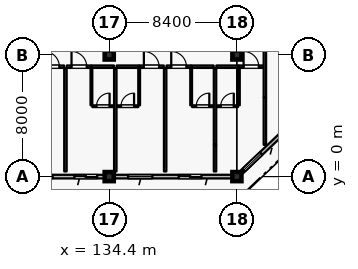
"""IFC4 building model, lengths in metres.
Left out: names, types, materials, properties, quantities, classifications, styles, units other than length and angle.
Written with IfcOpenShell. Run it as: python <this file> out.ifc"""

import sys

from ifc_helpers import new_model, si_unit, direction, frame, frame_2d, origin, origin_2d, place, context, subcontext, project, spatial, rectangle, extrude, element, fill, save


model = new_model("IFC4")
c1 = context("Model", 3, precision=1e-05, world=origin(), true_north=direction((0.0, 1.0)))
c2 = subcontext(c1, "Body", "Model", "MODEL_VIEW")
j1 = project(units=[si_unit("LENGTHUNIT", "METRE"), si_unit("PLANEANGLEUNIT", "RADIAN")], contexts=[c1])
p1 = place(None, origin())
s1 = spatial("IfcSite", under=j1, at=p1, CompositionType="ELEMENT")
p2 = place(p1, origin())
s2 = spatial("IfcBuilding", under=s1, at=p2, CompositionType="ELEMENT")
p3 = place(p2, frame((0.0, 0.0, 39.6)))
s3 = spatial("IfcBuildingStorey", under=s2, at=p3, CompositionType="ELEMENT", Elevation=39.6)
for number, where, z_axis, x_axis in (
    (1, (134.4, 0.0, 0.0), (0.0, 0.0, 1.0), (1.0, 0.0, 0.0)),
    (2, (142.8, 0.0, 0.0), (0.0, 0.0, 1.0), (1.0, 0.0, 0.0)),
    (3, (134.4, 8.0, 0.0), (0.0, 0.0, 1.0), (1.0, 0.0, 0.0)),
    (4, (142.8, 8.0, 0.0), (0.0, 0.0, 1.0), (1.0, 0.0, 0.0)),
):
    element("IfcColumn", number, at=place(p3, frame(where, z_axis=z_axis, x_axis=x_axis)), inside=s3, PredefinedType="COLUMN", context=c2, shape_type="SweptSolid", body=[
        extrude(rectangle(XDim=0.6, YDim=0.6, at=origin_2d()), origin(), (0.0, 0.0, 1.0), 3.6),
    ])
p4 = place(p3, frame((134.1, 0.0, 0.0), z_axis=(0.0, 0.0, 1.0), x_axis=(-1.0, 0.0, 0.0)))
e5 = element("IfcWall", 5, at=p4, inside=s3, PredefinedType="SOLIDWALL", context=c2, shape_type="SweptSolid", body=[
    extrude(rectangle(XDim=7.8, YDim=0.24, at=frame_2d((3.9, 0.0))), origin(), (0.0, 0.0, 1.0), 2.89),
])
p5 = place(p4, frame((0.49, 0.0, 0.0)))
e6 = element("IfcOpeningElement", 6, at=p5, cuts=e5, PredefinedType="OPENING", context=c2, shape_type="SweptSolid", body=[
    extrude(rectangle(XDim=1.5, YDim=2.25, at=frame_2d((0.75, 1.125))), frame((0.0, 0.13, 0.0), z_axis=(0.0, -1.0, 0.0), x_axis=(1.0, 0.0, 0.0)), (0.0, 0.0, 1.0), 0.26),
])
p6 = place(p4, frame((3.42, 0.0, 0.8)))
e7 = element("IfcOpeningElement", 7, at=p6, cuts=e5, PredefinedType="OPENING", context=c2, shape_type="SweptSolid", body=[
    extrude(rectangle(XDim=1.6, YDim=1.6, at=frame_2d((0.8, 0.8))), frame((0.0, 0.13, 0.0), z_axis=(0.0, -1.0, 0.0), x_axis=(1.0, 0.0, 0.0)), (0.0, 0.0, 1.0), 0.26),
])
p7 = place(p4, frame((6.08, 0.0, 0.8)))
e8 = element("IfcOpeningElement", 8, at=p7, cuts=e5, PredefinedType="OPENING", context=c2, shape_type="SweptSolid", body=[
    extrude(rectangle(XDim=1.6, YDim=1.6, at=frame_2d((0.8, 0.8))), frame((0.0, 0.13, 0.0), z_axis=(0.0, -1.0, 0.0), x_axis=(1.0, 0.0, 0.0)), (0.0, 0.0, 1.0), 0.26),
])
p8 = place(p3, frame((142.5, 0.0, 0.0), z_axis=(0.0, 0.0, 1.0), x_axis=(-1.0, 0.0, 0.0)))
e9 = element("IfcWall", 9, at=p8, inside=s3, PredefinedType="SOLIDWALL", context=c2, shape_type="SweptSolid", body=[
    extrude(rectangle(XDim=7.8, YDim=0.24, at=frame_2d((3.9, 0.0))), origin(), (0.0, 0.0, 1.0), 2.94),
])
p9 = place(p8, frame((2.03, 0.0, 0.0)))
e10 = element("IfcOpeningElement", 10, at=p9, cuts=e9, PredefinedType="OPENING", context=c2, shape_type="SweptSolid", body=[
    extrude(rectangle(XDim=1.5, YDim=2.25, at=frame_2d((0.75, 1.125))), frame((0.0, 0.13, 0.0), z_axis=(0.0, -1.0, 0.0), x_axis=(1.0, 0.0, 0.0)), (0.0, 0.0, 1.0), 0.26),
])
p10 = place(p8, frame((5.26, 0.0, 0.8)))
e11 = element("IfcOpeningElement", 11, at=p10, cuts=e9, PredefinedType="OPENING", context=c2, shape_type="SweptSolid", body=[
    extrude(rectangle(XDim=1.6, YDim=1.6, at=frame_2d((0.8, 0.8))), frame((0.0, 0.13, 0.0), z_axis=(0.0, -1.0, 0.0), x_axis=(1.0, 0.0, 0.0)), (0.0, 0.0, 1.0), 0.26),
])
p11 = place(p3, frame((150.9, 7.714, 0.0), z_axis=(0.0, 0.0, 1.0), x_axis=(-0.724145477467, -0.689647248573, 0.0)))
e12 = element("IfcWall", 12, at=p11, inside=s3, PredefinedType="SOLIDWALL", context=c2, shape_type="SweptSolid", body=[
    extrude(rectangle(XDim=10.771, YDim=0.24, at=frame_2d((5.385, 0.0))), origin(), (0.0, 0.0, 1.0), 2.94),
])
p12 = place(p11, frame((1.238, 0.0, 0.0)))
e13 = element("IfcOpeningElement", 13, at=p12, cuts=e12, PredefinedType="OPENING", context=c2, shape_type="SweptSolid", body=[
    extrude(rectangle(XDim=1.5, YDim=2.25, at=frame_2d((0.75, 1.125))), frame((0.0, 0.13, 0.0), z_axis=(0.0, -1.0, 0.0), x_axis=(1.0, 0.0, 0.0)), (0.0, 0.0, 1.0), 0.26),
])
p13 = place(p11, frame((5.58, 0.0, 0.8)))
e14 = element("IfcOpeningElement", 14, at=p13, cuts=e12, PredefinedType="OPENING", context=c2, shape_type="SweptSolid", body=[
    extrude(rectangle(XDim=1.6, YDim=1.6, at=frame_2d((0.8, 0.8))), frame((0.0, 0.13, 0.0), z_axis=(0.0, -1.0, 0.0), x_axis=(1.0, 0.0, 0.0)), (0.0, 0.0, 1.0), 0.26),
])
p14 = place(p11, frame((8.977, 0.0, 0.8)))
e15 = element("IfcOpeningElement", 15, at=p14, cuts=e12, PredefinedType="OPENING", context=c2, shape_type="SweptSolid", body=[
    extrude(rectangle(XDim=1.6, YDim=1.6, at=frame_2d((0.8, 0.8))), frame((0.0, 0.13, 0.0), z_axis=(0.0, -1.0, 0.0), x_axis=(1.0, 0.0, 0.0)), (0.0, 0.0, 1.0), 0.26),
])
p15 = place(p3, frame((129.81, 7.23, 0.0), z_axis=(0.0, 0.0, 1.0), x_axis=(1.0, 0.0, 0.0)))
e16 = element("IfcWall", 16, at=p15, inside=s3, PredefinedType="PARTITIONING", context=c2, shape_type="SweptSolid", body=[
    extrude(rectangle(XDim=1.62, YDim=0.16, at=frame_2d((0.81, 0.0))), origin(), (0.0, 0.0, 1.0), 3.335),
])
p16 = place(p15, frame((0.31, 0.0, 0.0)))
e17 = element("IfcOpeningElement", 17, at=p16, cuts=e16, PredefinedType="OPENING", context=c2, shape_type="SweptSolid", body=[
    extrude(rectangle(XDim=1.0, YDim=2.25, at=frame_2d((0.5, 1.125))), frame((0.0, 0.09, 0.0), z_axis=(0.0, -1.0, 0.0), x_axis=(1.0, 0.0, 0.0)), (0.0, 0.0, 1.0), 0.18),
])
p17 = place(p3, frame((131.61, 7.23, 0.0), z_axis=(0.0, 0.0, 1.0), x_axis=(1.0, 0.0, 0.0)))
e18 = element("IfcWall", 18, at=p17, inside=s3, PredefinedType="PARTITIONING", context=c2, shape_type="SweptSolid", body=[
    extrude(rectangle(XDim=1.62, YDim=0.16, at=frame_2d((0.81, 0.0))), origin(), (0.0, 0.0, 1.0), 3.335),
])
p18 = place(p17, frame((0.31, 0.0, 0.0)))
e19 = element("IfcOpeningElement", 19, at=p18, cuts=e18, PredefinedType="OPENING", context=c2, shape_type="SweptSolid", body=[
    extrude(rectangle(XDim=1.0, YDim=2.25, at=frame_2d((0.5, 1.125))), frame((0.0, 0.09, 0.0), z_axis=(0.0, -1.0, 0.0), x_axis=(1.0, 0.0, 0.0)), (0.0, 0.0, 1.0), 0.18),
])
p19 = place(p3, frame((133.24, 7.23, 0.0), z_axis=(0.0, 0.0, 1.0), x_axis=(1.0, 0.0, 0.0)))
e20 = element("IfcWall", 20, at=p19, inside=s3, PredefinedType="PARTITIONING", context=c2, shape_type="SweptSolid", body=[
    extrude(rectangle(XDim=1.47, YDim=0.16, at=frame_2d((0.735, 0.0))), origin(), (0.0, 0.0, 1.0), 3.335),
])
p20 = place(p3, frame((133.23, 4.69, 0.0), z_axis=(0.0, 0.0, 1.0), x_axis=(0.0, 1.0, 0.0)))
e21 = element("IfcWall", 21, at=p20, inside=s3, PredefinedType="PARTITIONING", context=c2, shape_type="SweptSolid", body=[
    extrude(rectangle(XDim=2.45, YDim=0.115, at=frame_2d((1.225, 0.0))), origin(), (0.0, 0.0, 1.0), 3.335),
])
p21 = place(p3, frame((133.29, 4.63, 0.0), z_axis=(0.0, 0.0, 1.0), x_axis=(1.0, 0.0, 0.0)))
e22 = element("IfcWall", 22, at=p21, inside=s3, PredefinedType="PARTITIONING", context=c2, shape_type="SweptSolid", body=[
    extrude(rectangle(XDim=1.41, YDim=0.115, at=frame_2d((0.705, 0.0))), origin(), (0.0, 0.0, 1.0), 3.335),
])
p22 = place(p21, frame((0.275, 0.0, 0.0)))
e23 = element("IfcOpeningElement", 23, at=p22, cuts=e22, PredefinedType="OPENING", context=c2, shape_type="SweptSolid", body=[
    extrude(rectangle(XDim=0.86, YDim=2.12, at=frame_2d((0.43, 1.06))), frame((0.0, 0.067, 0.0), z_axis=(0.0, -1.0, 0.0), x_axis=(1.0, 0.0, 0.0)), (0.0, 0.0, 1.0), 0.135),
])
p23 = place(p3, frame((131.52, 0.34, 0.0), z_axis=(0.0, 0.0, 1.0), x_axis=(0.0, 1.0, 0.0)))
e24 = element("IfcWall", 24, at=p23, inside=s3, PredefinedType="PARTITIONING", context=c2, shape_type="SweptSolid", body=[
    extrude(rectangle(XDim=6.8, YDim=0.16, at=frame_2d((3.4, 0.0))), origin(), (0.0, 0.0, 1.0), 3.335),
])
p24 = place(p3, frame((134.89, 7.23, 0.0), z_axis=(0.0, 0.0, 1.0), x_axis=(1.0, 0.0, 0.0)))
e25 = element("IfcWall", 25, at=p24, inside=s3, PredefinedType="PARTITIONING", context=c2, shape_type="SweptSolid", body=[
    extrude(rectangle(XDim=1.47, YDim=0.16, at=frame_2d((0.735, 0.0))), origin(), (0.0, 0.0, 1.0), 3.335),
])
p25 = place(p3, frame((136.37, 7.23, 0.0), z_axis=(0.0, 0.0, 1.0), x_axis=(1.0, 0.0, 0.0)))
e26 = element("IfcWall", 26, at=p25, inside=s3, PredefinedType="PARTITIONING", context=c2, shape_type="SweptSolid", body=[
    extrude(rectangle(XDim=1.62, YDim=0.16, at=frame_2d((0.81, 0.0))), origin(), (0.0, 0.0, 1.0), 3.335),
])
p26 = place(p25, frame((0.31, 0.0, 0.0)))
e27 = element("IfcOpeningElement", 27, at=p26, cuts=e26, PredefinedType="OPENING", context=c2, shape_type="SweptSolid", body=[
    extrude(rectangle(XDim=1.0, YDim=2.25, at=frame_2d((0.5, 1.125))), frame((0.0, 0.09, 0.0), z_axis=(0.0, -1.0, 0.0), x_axis=(1.0, 0.0, 0.0)), (0.0, 0.0, 1.0), 0.18),
])
p27 = place(p3, frame((136.37, 4.69, 0.0), z_axis=(0.0, 0.0, 1.0), x_axis=(0.0, 1.0, 0.0)))
e28 = element("IfcWall", 28, at=p27, inside=s3, PredefinedType="PARTITIONING", context=c2, shape_type="SweptSolid", body=[
    extrude(rectangle(XDim=2.45, YDim=0.115, at=frame_2d((1.225, 0.0))), origin(), (0.0, 0.0, 1.0), 3.335),
])
p28 = place(p3, frame((134.9, 4.63, 0.0), z_axis=(0.0, 0.0, 1.0), x_axis=(1.0, 0.0, 0.0)))
e29 = element("IfcWall", 29, at=p28, inside=s3, PredefinedType="PARTITIONING", context=c2, shape_type="SweptSolid", body=[
    extrude(rectangle(XDim=1.41, YDim=0.115, at=frame_2d((0.705, 0.0))), origin(), (0.0, 0.0, 1.0), 3.335),
])
p29 = place(p28, frame((0.275, 0.0, 0.0)))
e30 = element("IfcOpeningElement", 30, at=p29, cuts=e29, PredefinedType="OPENING", context=c2, shape_type="SweptSolid", body=[
    extrude(rectangle(XDim=0.86, YDim=2.12, at=frame_2d((0.43, 1.06))), frame((0.0, 0.067, 0.0), z_axis=(0.0, -1.0, 0.0), x_axis=(1.0, 0.0, 0.0)), (0.0, 0.0, 1.0), 0.135),
])
p30 = place(p3, frame((134.8, 0.34, 0.0), z_axis=(0.0, 0.0, 1.0), x_axis=(0.0, 1.0, 0.0)))
e31 = element("IfcWall", 31, at=p30, inside=s3, PredefinedType="PARTITIONING", context=c2, shape_type="SweptSolid", body=[
    extrude(rectangle(XDim=6.8, YDim=0.16, at=frame_2d((3.4, 0.0))), origin(), (0.0, 0.0, 1.0), 3.335),
])
p31 = place(p3, frame((138.17, 7.23, 0.0), z_axis=(0.0, 0.0, 1.0), x_axis=(1.0, 0.0, 0.0)))
e32 = element("IfcWall", 32, at=p31, inside=s3, PredefinedType="PARTITIONING", context=c2, shape_type="SweptSolid", body=[
    extrude(rectangle(XDim=1.62, YDim=0.16, at=frame_2d((0.81, 0.0))), origin(), (0.0, 0.0, 1.0), 3.335),
])
p32 = place(p31, frame((0.31, 0.0, 0.0)))
e33 = element("IfcOpeningElement", 33, at=p32, cuts=e32, PredefinedType="OPENING", context=c2, shape_type="SweptSolid", body=[
    extrude(rectangle(XDim=1.0, YDim=2.25, at=frame_2d((0.5, 1.125))), frame((0.0, 0.09, 0.0), z_axis=(0.0, -1.0, 0.0), x_axis=(1.0, 0.0, 0.0)), (0.0, 0.0, 1.0), 0.18),
])
p33 = place(p3, frame((139.8, 7.23, 0.0), z_axis=(0.0, 0.0, 1.0), x_axis=(1.0, 0.0, 0.0)))
e34 = element("IfcWall", 34, at=p33, inside=s3, PredefinedType="PARTITIONING", context=c2, shape_type="SweptSolid", body=[
    extrude(rectangle(XDim=1.47, YDim=0.16, at=frame_2d((0.735, 0.0))), origin(), (0.0, 0.0, 1.0), 3.335),
])
p34 = place(p3, frame((139.79, 4.69, 0.0), z_axis=(0.0, 0.0, 1.0), x_axis=(0.0, 1.0, 0.0)))
e35 = element("IfcWall", 35, at=p34, inside=s3, PredefinedType="PARTITIONING", context=c2, shape_type="SweptSolid", body=[
    extrude(rectangle(XDim=2.45, YDim=0.115, at=frame_2d((1.225, 0.0))), origin(), (0.0, 0.0, 1.0), 3.335),
])
p35 = place(p3, frame((139.85, 4.63, 0.0), z_axis=(0.0, 0.0, 1.0), x_axis=(1.0, 0.0, 0.0)))
e36 = element("IfcWall", 36, at=p35, inside=s3, PredefinedType="PARTITIONING", context=c2, shape_type="SweptSolid", body=[
    extrude(rectangle(XDim=1.41, YDim=0.115, at=frame_2d((0.705, 0.0))), origin(), (0.0, 0.0, 1.0), 3.335),
])
p36 = place(p35, frame((0.275, 0.0, 0.0)))
e37 = element("IfcOpeningElement", 37, at=p36, cuts=e36, PredefinedType="OPENING", context=c2, shape_type="SweptSolid", body=[
    extrude(rectangle(XDim=0.86, YDim=2.12, at=frame_2d((0.43, 1.06))), frame((0.0, 0.067, 0.0), z_axis=(0.0, -1.0, 0.0), x_axis=(1.0, 0.0, 0.0)), (0.0, 0.0, 1.0), 0.135),
])
p37 = place(p3, frame((138.08, 0.34, 0.0), z_axis=(0.0, 0.0, 1.0), x_axis=(0.0, 1.0, 0.0)))
e38 = element("IfcWall", 38, at=p37, inside=s3, PredefinedType="PARTITIONING", context=c2, shape_type="SweptSolid", body=[
    extrude(rectangle(XDim=6.8, YDim=0.16, at=frame_2d((3.4, 0.0))), origin(), (0.0, 0.0, 1.0), 3.335),
])
p38 = place(p3, frame((141.36, 0.34, 0.0), z_axis=(0.0, 0.0, 1.0), x_axis=(0.0, 1.0, 0.0)))
e39 = element("IfcWall", 39, at=p38, inside=s3, PredefinedType="PARTITIONING", context=c2, shape_type="SweptSolid", body=[
    extrude(rectangle(XDim=1.74, YDim=0.16, at=frame_2d((0.87, 0.0))), origin(), (0.0, 0.0, 1.0), 3.335),
])
p39 = place(p3, frame((141.45, 7.23, 0.0), z_axis=(0.0, 0.0, 1.0), x_axis=(1.0, 0.0, 0.0)))
e40 = element("IfcWall", 40, at=p39, inside=s3, PredefinedType="PARTITIONING", context=c2, shape_type="SweptSolid", body=[
    extrude(rectangle(XDim=1.47, YDim=0.16, at=frame_2d((0.735, 0.0))), origin(), (0.0, 0.0, 1.0), 3.335),
])
p40 = place(p3, frame((142.93, 7.23, 0.0), z_axis=(0.0, 0.0, 1.0), x_axis=(1.0, 0.0, 0.0)))
e41 = element("IfcWall", 41, at=p40, inside=s3, PredefinedType="PARTITIONING", context=c2, shape_type="SweptSolid", body=[
    extrude(rectangle(XDim=1.62, YDim=0.16, at=frame_2d((0.81, 0.0))), origin(), (0.0, 0.0, 1.0), 3.335),
])
p41 = place(p40, frame((0.31, 0.0, 0.0)))
e42 = element("IfcOpeningElement", 42, at=p41, cuts=e41, PredefinedType="OPENING", context=c2, shape_type="SweptSolid", body=[
    extrude(rectangle(XDim=1.0, YDim=2.25, at=frame_2d((0.5, 1.125))), frame((0.0, 0.09, 0.0), z_axis=(0.0, -1.0, 0.0), x_axis=(1.0, 0.0, 0.0)), (0.0, 0.0, 1.0), 0.18),
])
p42 = place(p3, frame((142.93, 4.69, 0.0), z_axis=(0.0, 0.0, 1.0), x_axis=(0.0, 1.0, 0.0)))
e43 = element("IfcWall", 43, at=p42, inside=s3, PredefinedType="PARTITIONING", context=c2, shape_type="SweptSolid", body=[
    extrude(rectangle(XDim=2.45, YDim=0.115, at=frame_2d((1.225, 0.0))), origin(), (0.0, 0.0, 1.0), 2.74),
])
p43 = place(p3, frame((141.46, 4.63, 0.0), z_axis=(0.0, 0.0, 1.0), x_axis=(1.0, 0.0, 0.0)))
e44 = element("IfcWall", 44, at=p43, inside=s3, PredefinedType="PARTITIONING", context=c2, shape_type="SweptSolid", body=[
    extrude(rectangle(XDim=1.41, YDim=0.115, at=frame_2d((0.705, 0.0))), origin(), (0.0, 0.0, 1.0), 3.335),
])
p44 = place(p43, frame((0.275, 0.0, 0.0)))
e45 = element("IfcOpeningElement", 45, at=p44, cuts=e44, PredefinedType="OPENING", context=c2, shape_type="SweptSolid", body=[
    extrude(rectangle(XDim=0.86, YDim=2.12, at=frame_2d((0.43, 1.06))), frame((0.0, 0.067, 0.0), z_axis=(0.0, -1.0, 0.0), x_axis=(1.0, 0.0, 0.0)), (0.0, 0.0, 1.0), 0.135),
])
p45 = place(p3, frame((141.36, 2.09, 0.0), z_axis=(0.0, 0.0, 1.0), x_axis=(0.0, 1.0, 0.0)))
e46 = element("IfcWall", 46, at=p45, inside=s3, PredefinedType="PARTITIONING", context=c2, shape_type="SweptSolid", body=[
    extrude(rectangle(XDim=5.05, YDim=0.16, at=frame_2d((2.525, 0.0))), origin(), (0.0, 0.0, 1.0), 3.335),
])
p46 = place(p3, frame((144.64, 2.09, 0.0), z_axis=(0.0, 0.0, 1.0), x_axis=(0.0, 1.0, 0.0)))
e47 = element("IfcWall", 47, at=p46, inside=s3, PredefinedType="PARTITIONING", context=c2, shape_type="SweptSolid", body=[
    extrude(rectangle(XDim=3.12, YDim=0.16, at=frame_2d((1.56, 0.0))), origin(), (0.0, 0.0, 1.0), 3.335),
])
p47 = place(p3, frame((144.64, 5.22, 0.0), z_axis=(0.0, 0.0, 1.0), x_axis=(0.0, 1.0, 0.0)))
e48 = element("IfcWall", 48, at=p47, inside=s3, PredefinedType="PARTITIONING", context=c2, shape_type="SweptSolid", body=[
    extrude(rectangle(XDim=9.32, YDim=0.16, at=frame_2d((4.66, 0.0))), origin(), (0.0, 0.0, 1.0), 3.335),
])
p48 = place(p5, origin())
e49 = element("IfcDoor", 49, at=p48, inside=s3, OperationType="SLIDING_TO_LEFT", PredefinedType="DOOR", context=c2, shape_type="SweptSolid", body=[
    extrude(rectangle(XDim=1.5, YDim=2.25, at=frame_2d((0.75, 1.125))), frame((0.0, 0.025, 0.0), z_axis=(0.0, -1.0, 0.0), x_axis=(1.0, 0.0, 0.0)), (0.0, 0.0, 1.0), 0.05),
])
fill(e6, e49)
p49 = place(p6, origin())
e50 = element("IfcWindow", 50, at=p49, inside=s3, PartitioningType="SINGLE_PANEL", PredefinedType="WINDOW", context=c2, shape_type="SweptSolid", body=[
    extrude(rectangle(XDim=1.6, YDim=1.6, at=frame_2d((0.8, 0.8))), frame((0.0, 0.03, 0.0), z_axis=(0.0, -1.0, 0.0), x_axis=(1.0, 0.0, 0.0)), (0.0, 0.0, 1.0), 0.06),
])
fill(e7, e50)
p50 = place(p9, origin())
e51 = element("IfcDoor", 51, at=p50, inside=s3, OperationType="SLIDING_TO_LEFT", PredefinedType="DOOR", context=c2, shape_type="SweptSolid", body=[
    extrude(rectangle(XDim=1.5, YDim=2.25, at=frame_2d((0.75, 1.125))), frame((0.0, 0.025, 0.0), z_axis=(0.0, -1.0, 0.0), x_axis=(1.0, 0.0, 0.0)), (0.0, 0.0, 1.0), 0.05),
])
fill(e10, e51)
p51 = place(p10, origin())
e52 = element("IfcWindow", 52, at=p51, inside=s3, PartitioningType="SINGLE_PANEL", PredefinedType="WINDOW", context=c2, shape_type="SweptSolid", body=[
    extrude(rectangle(XDim=1.6, YDim=1.6, at=frame_2d((0.8, 0.8))), frame((0.0, 0.03, 0.0), z_axis=(0.0, -1.0, 0.0), x_axis=(1.0, 0.0, 0.0)), (0.0, 0.0, 1.0), 0.06),
])
fill(e11, e52)
p52 = place(p14, origin())
e53 = element("IfcWindow", 53, at=p52, inside=s3, PartitioningType="SINGLE_PANEL", PredefinedType="WINDOW", context=c2, shape_type="SweptSolid", body=[
    extrude(rectangle(XDim=1.6, YDim=1.6, at=frame_2d((0.8, 0.8))), frame((0.0, 0.03, 0.0), z_axis=(0.0, -1.0, 0.0), x_axis=(1.0, 0.0, 0.0)), (0.0, 0.0, 1.0), 0.06),
])
fill(e15, e53)
p53 = place(p16, origin())
e54 = element("IfcDoor", 54, at=p53, inside=s3, OperationType="SINGLE_SWING_LEFT", PredefinedType="DOOR", context=c2, shape_type="SweptSolid", body=[
    extrude(rectangle(XDim=1.0, YDim=2.25, at=frame_2d((0.5, 1.125))), frame((0.0, 0.025, 0.0), z_axis=(0.0, -1.0, 0.0), x_axis=(1.0, 0.0, 0.0)), (0.0, 0.0, 1.0), 0.05),
])
fill(e17, e54)
p54 = place(p18, origin())
e55 = element("IfcDoor", 55, at=p54, inside=s3, OperationType="SINGLE_SWING_LEFT", PredefinedType="DOOR", context=c2, shape_type="SweptSolid", body=[
    extrude(rectangle(XDim=1.0, YDim=2.25, at=frame_2d((0.5, 1.125))), frame((0.0, 0.025, 0.0), z_axis=(0.0, -1.0, 0.0), x_axis=(1.0, 0.0, 0.0)), (0.0, 0.0, 1.0), 0.05),
])
fill(e19, e55)
p55 = place(p22, origin())
e56 = element("IfcDoor", 56, at=p55, inside=s3, OperationType="SINGLE_SWING_RIGHT", PredefinedType="DOOR", context=c2, shape_type="SweptSolid", body=[
    extrude(rectangle(XDim=0.86, YDim=2.12, at=frame_2d((0.43, 1.06))), frame((0.0, 0.025, 0.0), z_axis=(0.0, -1.0, 0.0), x_axis=(1.0, 0.0, 0.0)), (0.0, 0.0, 1.0), 0.05),
])
fill(e23, e56)
p56 = place(p26, origin())
e57 = element("IfcDoor", 57, at=p56, inside=s3, OperationType="SINGLE_SWING_LEFT", PredefinedType="DOOR", context=c2, shape_type="SweptSolid", body=[
    extrude(rectangle(XDim=1.0, YDim=2.25, at=frame_2d((0.5, 1.125))), frame((0.0, 0.025, 0.0), z_axis=(0.0, -1.0, 0.0), x_axis=(1.0, 0.0, 0.0)), (0.0, 0.0, 1.0), 0.05),
])
fill(e27, e57)
p57 = place(p29, origin())
e58 = element("IfcDoor", 58, at=p57, inside=s3, OperationType="SINGLE_SWING_RIGHT", PredefinedType="DOOR", context=c2, shape_type="SweptSolid", body=[
    extrude(rectangle(XDim=0.86, YDim=2.12, at=frame_2d((0.43, 1.06))), frame((0.0, 0.025, 0.0), z_axis=(0.0, -1.0, 0.0), x_axis=(1.0, 0.0, 0.0)), (0.0, 0.0, 1.0), 0.05),
])
fill(e30, e58)
p58 = place(p32, origin())
e59 = element("IfcDoor", 59, at=p58, inside=s3, OperationType="SINGLE_SWING_LEFT", PredefinedType="DOOR", context=c2, shape_type="SweptSolid", body=[
    extrude(rectangle(XDim=1.0, YDim=2.25, at=frame_2d((0.5, 1.125))), frame((0.0, 0.025, 0.0), z_axis=(0.0, -1.0, 0.0), x_axis=(1.0, 0.0, 0.0)), (0.0, 0.0, 1.0), 0.05),
])
fill(e33, e59)
p59 = place(p36, origin())
e60 = element("IfcDoor", 60, at=p59, inside=s3, OperationType="SINGLE_SWING_RIGHT", PredefinedType="DOOR", context=c2, shape_type="SweptSolid", body=[
    extrude(rectangle(XDim=0.86, YDim=2.12, at=frame_2d((0.43, 1.06))), frame((0.0, 0.025, 0.0), z_axis=(0.0, -1.0, 0.0), x_axis=(1.0, 0.0, 0.0)), (0.0, 0.0, 1.0), 0.05),
])
fill(e37, e60)
p60 = place(p41, origin())
e61 = element("IfcDoor", 61, at=p60, inside=s3, OperationType="SINGLE_SWING_LEFT", PredefinedType="DOOR", context=c2, shape_type="SweptSolid", body=[
    extrude(rectangle(XDim=1.0, YDim=2.25, at=frame_2d((0.5, 1.125))), frame((0.0, 0.025, 0.0), z_axis=(0.0, -1.0, 0.0), x_axis=(1.0, 0.0, 0.0)), (0.0, 0.0, 1.0), 0.05),
])
fill(e42, e61)
p61 = place(p44, origin())
e62 = element("IfcDoor", 62, at=p61, inside=s3, OperationType="SINGLE_SWING_RIGHT", PredefinedType="DOOR", context=c2, shape_type="SweptSolid", body=[
    extrude(rectangle(XDim=0.86, YDim=2.12, at=frame_2d((0.43, 1.06))), frame((0.0, 0.025, 0.0), z_axis=(0.0, -1.0, 0.0), x_axis=(1.0, 0.0, 0.0)), (0.0, 0.0, 1.0), 0.05),
])
fill(e45, e62)
save(model, sys.argv[1])
